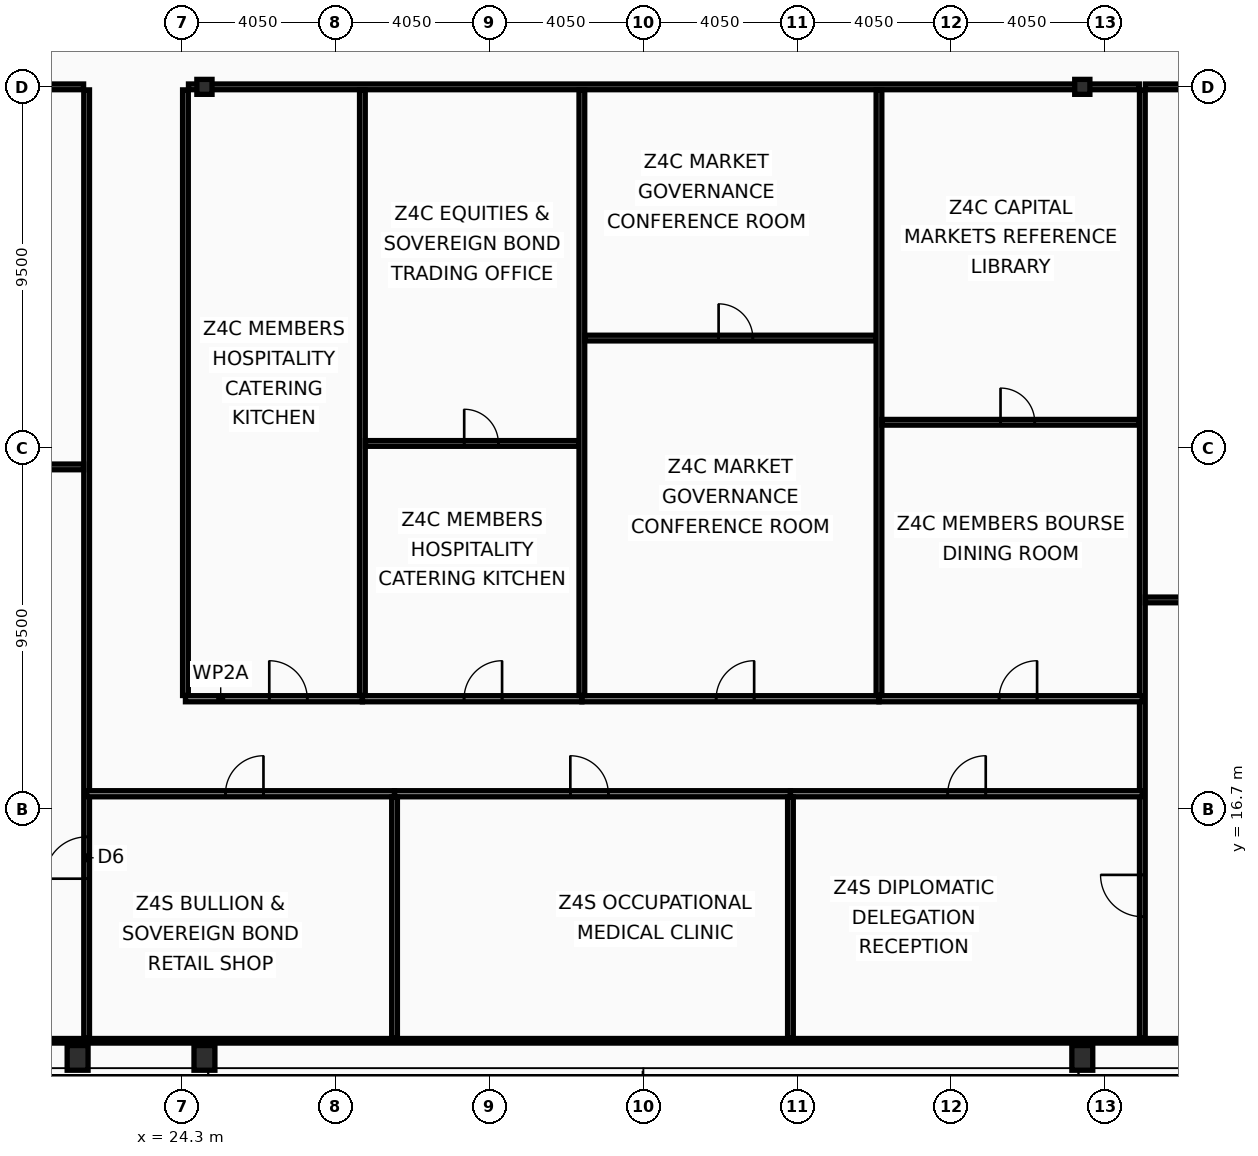
"""IFC4 building model, lengths in metres.
Left out: names, types, materials, properties, quantities, classifications, styles, units other than length and angle.
Written with IfcOpenShell. Run it as: python <this file> out.ifc"""

import sys

from ifc_helpers import new_model, si_unit, direction, frame, frame_2d, origin, origin_2d, place, context, subcontext, project, spatial, rectangle, hollow_rectangle, i_section, extrude, element, fill, save


model = new_model("IFC4")
c1 = context("Model", 3, precision=1e-05, world=origin(), true_north=direction((0.0, 1.0)))
c2 = subcontext(c1, "Body", "Model", "MODEL_VIEW")
j1 = project(units=[si_unit("LENGTHUNIT", "METRE"), si_unit("PLANEANGLEUNIT", "RADIAN")], contexts=[c1])
p1 = place(None, origin())
s1 = spatial("IfcSite", under=j1, at=p1, CompositionType="ELEMENT")
p2 = place(p1, origin())
s2 = spatial("IfcBuilding", under=s1, at=p2, CompositionType="ELEMENT")
p3 = place(p2, frame((0.0, 0.0, 318.2)))
s3 = spatial("IfcBuildingStorey", under=s2, at=p3, CompositionType="ELEMENT", Elevation=318.2)
for number, where, z_axis, x_axis in (
    (1, (21.562, 10.15, 0.0), (0.0, 0.0, 1.0), (1.0, 0.0, 0.0)),
    (2, (24.9, 10.15, 0.0), (0.0, 0.0, 1.0), (1.0, 0.0, 0.0)),
    (3, (48.0, 10.15, 0.0), (0.0, 0.0, 1.0), (1.0, 0.0, 0.0)),
):
    element("IfcColumn", number, at=place(p3, frame(where, z_axis=z_axis, x_axis=x_axis)), inside=s3, PredefinedType="COLUMN", context=c2, shape_type="SweptSolid", body=[
        extrude(hollow_rectangle(XDim=0.55, YDim=0.65, WallThickness=0.04, at=origin_2d()), origin(), (0.0, 0.0, 1.0), 3.6),
    ])
for number, where, z_axis, x_axis in (
    (4, (24.9, 35.7, 0.0), (0.0, 0.0, 1.0), (1.0, 0.0, 0.0)),
    (5, (48.0, 35.7, 0.0), (0.0, 0.0, 1.0), (1.0, 0.0, 0.0)),
):
    element("IfcColumn", number, at=place(p3, frame(where, z_axis=z_axis, x_axis=x_axis)), inside=s3, PredefinedType="COLUMN", context=c2, shape_type="SweptSolid", body=[
        extrude(i_section(OverallWidth=0.399, OverallDepth=0.393, WebThickness=0.023, FlangeThickness=0.037, at=origin_2d()), origin(), (0.0, 0.0, 1.0), 3.6),
    ])
p4 = place(p3, frame((21.8, 10.665, 0.0), z_axis=(0.0, 0.0, 1.0), x_axis=(0.0, 1.0, 0.0)))
e6 = element("IfcWall", 6, at=p4, inside=s3, PredefinedType="PARTITIONING", context=c2, shape_type="SweptSolid", body=[
    extrude(rectangle(XDim=24.955, YDim=0.15, at=frame_2d((12.478, 0.0))), origin(), (0.0, 0.0, 1.0), 3.07),
])
p5 = place(p4, frame((4.2, 0.0, 0.0)))
e7 = element("IfcOpeningElement", 7, at=p5, cuts=e6, PredefinedType="OPENING", context=c2, shape_type="SweptSolid", body=[
    extrude(rectangle(XDim=1.1, YDim=2.1, at=frame_2d((0.55, 1.05))), frame((0.0, 0.085, 0.0), z_axis=(0.0, -1.0, 0.0), x_axis=(1.0, 0.0, 0.0)), (0.0, 0.0, 1.0), 0.17),
])
p6 = place(p3, frame((12.095, 35.7, 0.0), z_axis=(0.0, 0.0, 1.0), x_axis=(1.0, 0.0, 0.0)))
e8 = element("IfcWall", 8, at=p6, inside=s3, PredefinedType="PARTITIONING", context=c2, shape_type="SweptSolid", body=[
    extrude(rectangle(XDim=9.625, YDim=0.15, at=frame_2d((4.812, 0.0))), origin(), (0.0, 0.0, 1.0), 2.83),
])
p7 = place(p6, frame((2.8, 0.0, 0.0)))
e9 = element("IfcOpeningElement", 9, at=p7, cuts=e8, PredefinedType="OPENING", context=c2, shape_type="SweptSolid", body=[
    extrude(rectangle(XDim=1.0, YDim=2.05, at=frame_2d((0.5, 1.025))), frame((0.0, 0.085, 0.0), z_axis=(0.0, -1.0, 0.0), x_axis=(1.0, 0.0, 0.0)), (0.0, 0.0, 1.0), 0.17),
])
p8 = place(p3, frame((12.095, 25.7, 0.0), z_axis=(0.0, 0.0, 1.0), x_axis=(1.0, 0.0, 0.0)))
e10 = element("IfcWall", 10, at=p8, inside=s3, PredefinedType="PARTITIONING", context=c2, shape_type="SweptSolid", body=[
    extrude(rectangle(XDim=9.625, YDim=0.15, at=frame_2d((4.812, 0.0))), origin(), (0.0, 0.0, 1.0), 2.83),
])
p9 = place(p8, frame((2.2, 0.0, 0.0)))
e11 = element("IfcOpeningElement", 11, at=p9, cuts=e10, PredefinedType="OPENING", context=c2, shape_type="SweptSolid", body=[
    extrude(rectangle(XDim=0.9, YDim=2.05, at=frame_2d((0.45, 1.025))), frame((0.0, 0.085, 0.0), z_axis=(0.0, -1.0, 0.0), x_axis=(1.0, 0.0, 0.0)), (0.0, 0.0, 1.0), 0.17),
])
p10 = place(p3, frame((24.4, 19.685, 0.0), z_axis=(0.0, 0.0, 1.0), x_axis=(0.0, 1.0, 0.0)))
e12 = element("IfcWall", 12, at=p10, inside=s3, PredefinedType="PARTITIONING", context=c2, shape_type="SweptSolid", body=[
    extrude(rectangle(XDim=15.935, YDim=0.15, at=frame_2d((7.968, 0.0))), origin(), (0.0, 0.0, 1.0), 2.83),
])
p11 = place(p3, frame((49.58, 10.665, 0.0), z_axis=(0.0, 0.0, 1.0), x_axis=(0.0, 1.0, 0.0)))
e13 = element("IfcWall", 13, at=p11, inside=s3, PredefinedType="PARTITIONING", context=c2, shape_type="SweptSolid", body=[
    extrude(rectangle(XDim=24.955, YDim=0.15, at=frame_2d((12.478, 0.0))), origin(), (0.0, 0.0, 1.0), 3.07),
])
p12 = place(p11, frame((3.2, 0.0, 0.0)))
e14 = element("IfcOpeningElement", 14, at=p12, cuts=e13, PredefinedType="OPENING", context=c2, shape_type="SweptSolid", body=[
    extrude(rectangle(XDim=1.1, YDim=2.1, at=frame_2d((0.55, 1.05))), frame((0.0, 0.085, 0.0), z_axis=(0.0, -1.0, 0.0), x_axis=(1.0, 0.0, 0.0)), (0.0, 0.0, 1.0), 0.17),
])
p13 = place(p3, frame((24.48, 35.7, 0.0), z_axis=(0.0, 0.0, 1.0), x_axis=(1.0, 0.0, 0.0)))
e15 = element("IfcWall", 15, at=p13, inside=s3, PredefinedType="PARTITIONING", context=c2, shape_type="SweptSolid", body=[
    extrude(rectangle(XDim=25.02, YDim=0.15, at=frame_2d((12.51, 0.0))), origin(), (0.0, 0.0, 1.0), 2.83),
])
p14 = place(p3, frame((49.66, 35.7, 0.0), z_axis=(0.0, 0.0, 1.0), x_axis=(1.0, 0.0, 0.0)))
e16 = element("IfcWall", 16, at=p14, inside=s3, PredefinedType="PARTITIONING", context=c2, shape_type="SweptSolid", body=[
    extrude(rectangle(XDim=11.145, YDim=0.15, at=frame_2d((5.573, 0.0))), origin(), (0.0, 0.0, 1.0), 2.83),
])
p15 = place(p14, frame((2.2, 0.0, 0.0)))
e17 = element("IfcOpeningElement", 17, at=p15, cuts=e16, PredefinedType="OPENING", context=c2, shape_type="SweptSolid", body=[
    extrude(rectangle(XDim=1.0, YDim=2.05, at=frame_2d((0.5, 1.025))), frame((0.0, 0.085, 0.0), z_axis=(0.0, -1.0, 0.0), x_axis=(1.0, 0.0, 0.0)), (0.0, 0.0, 1.0), 0.17),
])
p16 = place(p3, frame((49.66, 22.2, 0.0), z_axis=(0.0, 0.0, 1.0), x_axis=(1.0, 0.0, 0.0)))
e18 = element("IfcWall", 18, at=p16, inside=s3, PredefinedType="PARTITIONING", context=c2, shape_type="SweptSolid", body=[
    extrude(rectangle(XDim=11.145, YDim=0.15, at=frame_2d((5.573, 0.0))), origin(), (0.0, 0.0, 1.0), 2.83),
])
p17 = place(p16, frame((2.2, 0.0, 0.0)))
e19 = element("IfcOpeningElement", 19, at=p17, cuts=e18, PredefinedType="OPENING", context=c2, shape_type="SweptSolid", body=[
    extrude(rectangle(XDim=0.9, YDim=2.05, at=frame_2d((0.45, 1.025))), frame((0.0, 0.085, 0.0), z_axis=(0.0, -1.0, 0.0), x_axis=(1.0, 0.0, 0.0)), (0.0, 0.0, 1.0), 0.17),
])
p18 = place(p3, frame((24.4, 19.6, 0.0), z_axis=(0.0, 0.0, 1.0), x_axis=(1.0, 0.0, 0.0)))
e20 = element("IfcWall", 20, at=p18, inside=s3, PredefinedType="PARTITIONING", context=c2, shape_type="SweptSolid", body=[
    extrude(rectangle(XDim=4.656, YDim=0.16, at=frame_2d((2.328, 0.0))), origin(), (0.0, 0.0, 1.0), 2.83),
])
p19 = place(p18, frame((2.206, 0.0, 0.0)))
e21 = element("IfcOpeningElement", 21, at=p19, cuts=e20, PredefinedType="OPENING", context=c2, shape_type="SweptSolid", body=[
    extrude(rectangle(XDim=1.0, YDim=2.05, at=frame_2d((0.5, 1.025))), frame((0.0, 0.09, 0.0), z_axis=(0.0, -1.0, 0.0), x_axis=(1.0, 0.0, 0.0)), (0.0, 0.0, 1.0), 0.18),
])
p20 = place(p3, frame((29.056, 19.6, 0.0), z_axis=(0.0, 0.0, 1.0), x_axis=(1.0, 0.0, 0.0)))
e22 = element("IfcWall", 22, at=p20, inside=s3, PredefinedType="PARTITIONING", context=c2, shape_type="SweptSolid", body=[
    extrude(rectangle(XDim=5.775, YDim=0.16, at=frame_2d((2.888, 0.0))), origin(), (0.0, 0.0, 1.0), 3.44),
])
p21 = place(p20, frame((2.676, 0.0, 0.0)))
e23 = element("IfcOpeningElement", 23, at=p21, cuts=e22, PredefinedType="OPENING", context=c2, shape_type="SweptSolid", body=[
    extrude(rectangle(XDim=1.0, YDim=2.05, at=frame_2d((0.5, 1.025))), frame((0.0, 0.09, 0.0), z_axis=(0.0, -1.0, 0.0), x_axis=(1.0, 0.0, 0.0)), (0.0, 0.0, 1.0), 0.18),
])
p22 = place(p3, frame((29.056, 19.685, 0.0), z_axis=(0.0, 0.0, 1.0), x_axis=(0.0, 1.0, 0.0)))
e24 = element("IfcWall", 24, at=p22, inside=s3, PredefinedType="PARTITIONING", context=c2, shape_type="SweptSolid", body=[
    extrude(rectangle(XDim=15.935, YDim=0.15, at=frame_2d((7.968, 0.0))), origin(), (0.0, 0.0, 1.0), 3.07),
])
p23 = place(p3, frame((29.136, 26.317, 0.0), z_axis=(0.0, 0.0, 1.0), x_axis=(1.0, 0.0, 0.0)))
e25 = element("IfcWall", 25, at=p23, inside=s3, PredefinedType="PARTITIONING", context=c2, shape_type="SweptSolid", body=[
    extrude(rectangle(XDim=5.615, YDim=0.15, at=frame_2d((2.808, 0.0))), origin(), (0.0, 0.0, 1.0), 3.44),
])
p24 = place(p23, frame((2.599, 0.0, 0.0)))
e26 = element("IfcOpeningElement", 26, at=p24, cuts=e25, PredefinedType="OPENING", context=c2, shape_type="SweptSolid", body=[
    extrude(rectangle(XDim=0.9, YDim=2.05, at=frame_2d((0.45, 1.025))), frame((0.0, 0.085, 0.0), z_axis=(0.0, -1.0, 0.0), x_axis=(1.0, 0.0, 0.0)), (0.0, 0.0, 1.0), 0.17),
])
p25 = place(p3, frame((34.832, 19.6, 0.0), z_axis=(0.0, 0.0, 1.0), x_axis=(1.0, 0.0, 0.0)))
e27 = element("IfcWall", 27, at=p25, inside=s3, PredefinedType="PARTITIONING", context=c2, shape_type="SweptSolid", body=[
    extrude(rectangle(XDim=7.818, YDim=0.16, at=frame_2d((3.909, 0.0))), origin(), (0.0, 0.0, 1.0), 3.44),
])
p26 = place(p25, frame((3.534, 0.0, 0.0)))
e28 = element("IfcOpeningElement", 28, at=p26, cuts=e27, PredefinedType="OPENING", context=c2, shape_type="SweptSolid", body=[
    extrude(rectangle(XDim=1.0, YDim=2.05, at=frame_2d((0.5, 1.025))), frame((0.0, 0.09, 0.0), z_axis=(0.0, -1.0, 0.0), x_axis=(1.0, 0.0, 0.0)), (0.0, 0.0, 1.0), 0.18),
])
p27 = place(p3, frame((34.832, 19.685, 0.0), z_axis=(0.0, 0.0, 1.0), x_axis=(0.0, 1.0, 0.0)))
e29 = element("IfcWall", 29, at=p27, inside=s3, PredefinedType="PARTITIONING", context=c2, shape_type="SweptSolid", body=[
    extrude(rectangle(XDim=15.935, YDim=0.15, at=frame_2d((7.968, 0.0))), origin(), (0.0, 0.0, 1.0), 3.07),
])
p28 = place(p3, frame((34.912, 29.09, 0.0), z_axis=(0.0, 0.0, 1.0), x_axis=(1.0, 0.0, 0.0)))
e30 = element("IfcWall", 30, at=p28, inside=s3, PredefinedType="PARTITIONING", context=c2, shape_type="SweptSolid", body=[
    extrude(rectangle(XDim=7.658, YDim=0.15, at=frame_2d((3.829, 0.0))), origin(), (0.0, 0.0, 1.0), 3.44),
])
p29 = place(p28, frame((3.518, 0.0, 0.0)))
e31 = element("IfcOpeningElement", 31, at=p29, cuts=e30, PredefinedType="OPENING", context=c2, shape_type="SweptSolid", body=[
    extrude(rectangle(XDim=0.9, YDim=2.05, at=frame_2d((0.45, 1.025))), frame((0.0, 0.085, 0.0), z_axis=(0.0, -1.0, 0.0), x_axis=(1.0, 0.0, 0.0)), (0.0, 0.0, 1.0), 0.17),
])
p30 = place(p3, frame((42.65, 19.6, 0.0), z_axis=(0.0, 0.0, 1.0), x_axis=(1.0, 0.0, 0.0)))
e32 = element("IfcWall", 32, at=p30, inside=s3, PredefinedType="PARTITIONING", context=c2, shape_type="SweptSolid", body=[
    extrude(rectangle(XDim=6.93, YDim=0.16, at=frame_2d((3.465, 0.0))), origin(), (0.0, 0.0, 1.0), 2.83),
])
p31 = place(p30, frame((3.161, 0.0, 0.0)))
e33 = element("IfcOpeningElement", 33, at=p31, cuts=e32, PredefinedType="OPENING", context=c2, shape_type="SweptSolid", body=[
    extrude(rectangle(XDim=1.0, YDim=2.05, at=frame_2d((0.5, 1.025))), frame((0.0, 0.09, 0.0), z_axis=(0.0, -1.0, 0.0), x_axis=(1.0, 0.0, 0.0)), (0.0, 0.0, 1.0), 0.18),
])
p32 = place(p3, frame((42.65, 19.685, 0.0), z_axis=(0.0, 0.0, 1.0), x_axis=(0.0, 1.0, 0.0)))
e34 = element("IfcWall", 34, at=p32, inside=s3, PredefinedType="PARTITIONING", context=c2, shape_type="SweptSolid", body=[
    extrude(rectangle(XDim=15.935, YDim=0.15, at=frame_2d((7.968, 0.0))), origin(), (0.0, 0.0, 1.0), 3.07),
])
p33 = place(p3, frame((42.73, 26.874, 0.0), z_axis=(0.0, 0.0, 1.0), x_axis=(1.0, 0.0, 0.0)))
e35 = element("IfcWall", 35, at=p33, inside=s3, PredefinedType="PARTITIONING", context=c2, shape_type="SweptSolid", body=[
    extrude(rectangle(XDim=6.77, YDim=0.15, at=frame_2d((3.385, 0.0))), origin(), (0.0, 0.0, 1.0), 2.83),
])
p34 = place(p33, frame((3.119, 0.0, 0.0)))
e36 = element("IfcOpeningElement", 36, at=p34, cuts=e35, PredefinedType="OPENING", context=c2, shape_type="SweptSolid", body=[
    extrude(rectangle(XDim=0.9, YDim=2.05, at=frame_2d((0.45, 1.025))), frame((0.0, 0.085, 0.0), z_axis=(0.0, -1.0, 0.0), x_axis=(1.0, 0.0, 0.0)), (0.0, 0.0, 1.0), 0.17),
])
p35 = place(p3, frame((21.8, 17.1, 0.0), z_axis=(0.0, 0.0, 1.0), x_axis=(1.0, 0.0, 0.0)))
e37 = element("IfcWall", 37, at=p35, inside=s3, PredefinedType="PARTITIONING", context=c2, shape_type="SweptSolid", body=[
    extrude(rectangle(XDim=8.103, YDim=0.16, at=frame_2d((4.051, 0.0))), origin(), (0.0, 0.0, 1.0), 2.83),
])
p36 = place(p35, frame((3.653, 0.0, 0.0)))
e38 = element("IfcOpeningElement", 38, at=p36, cuts=e37, PredefinedType="OPENING", context=c2, shape_type="SweptSolid", body=[
    extrude(rectangle(XDim=1.0, YDim=2.05, at=frame_2d((0.5, 1.025))), frame((0.0, 0.09, 0.0), z_axis=(0.0, -1.0, 0.0), x_axis=(1.0, 0.0, 0.0)), (0.0, 0.0, 1.0), 0.18),
])
p37 = place(p3, frame((29.903, 17.1, 0.0), z_axis=(0.0, 0.0, 1.0), x_axis=(1.0, 0.0, 0.0)))
e39 = element("IfcWall", 39, at=p37, inside=s3, PredefinedType="PARTITIONING", context=c2, shape_type="SweptSolid", body=[
    extrude(rectangle(XDim=10.417, YDim=0.16, at=frame_2d((5.209, 0.0))), origin(), (0.0, 0.0, 1.0), 3.44),
])
p38 = place(p37, frame((4.625, 0.0, 0.0)))
e40 = element("IfcOpeningElement", 40, at=p38, cuts=e39, PredefinedType="OPENING", context=c2, shape_type="SweptSolid", body=[
    extrude(rectangle(XDim=1.0, YDim=2.05, at=frame_2d((0.5, 1.025))), frame((0.0, 0.09, 0.0), z_axis=(0.0, -1.0, 0.0), x_axis=(1.0, 0.0, 0.0)), (0.0, 0.0, 1.0), 0.18),
])
p39 = place(p3, frame((29.903, 10.665, 0.0), z_axis=(0.0, 0.0, 1.0), x_axis=(0.0, 1.0, 0.0)))
e41 = element("IfcWall", 41, at=p39, inside=s3, PredefinedType="PARTITIONING", context=c2, shape_type="SweptSolid", body=[
    extrude(rectangle(XDim=6.35, YDim=0.15, at=frame_2d((3.175, 0.0))), origin(), (0.0, 0.0, 1.0), 3.07),
])
p40 = place(p3, frame((40.32, 17.1, 0.0), z_axis=(0.0, 0.0, 1.0), x_axis=(1.0, 0.0, 0.0)))
e42 = element("IfcWall", 42, at=p40, inside=s3, PredefinedType="PARTITIONING", context=c2, shape_type="SweptSolid", body=[
    extrude(rectangle(XDim=9.26, YDim=0.16, at=frame_2d((4.63, 0.0))), origin(), (0.0, 0.0, 1.0), 2.83),
])
p41 = place(p40, frame((4.139, 0.0, 0.0)))
e43 = element("IfcOpeningElement", 43, at=p41, cuts=e42, PredefinedType="OPENING", context=c2, shape_type="SweptSolid", body=[
    extrude(rectangle(XDim=1.0, YDim=2.05, at=frame_2d((0.5, 1.025))), frame((0.0, 0.09, 0.0), z_axis=(0.0, -1.0, 0.0), x_axis=(1.0, 0.0, 0.0)), (0.0, 0.0, 1.0), 0.18),
])
p42 = place(p3, frame((40.32, 10.665, 0.0), z_axis=(0.0, 0.0, 1.0), x_axis=(0.0, 1.0, 0.0)))
e44 = element("IfcWall", 44, at=p42, inside=s3, PredefinedType="PARTITIONING", context=c2, shape_type="SweptSolid", body=[
    extrude(rectangle(XDim=6.35, YDim=0.15, at=frame_2d((3.175, 0.0))), origin(), (0.0, 0.0, 1.0), 3.07),
])
p43 = place(p3, frame((12.095, 10.6, 0.0), z_axis=(0.0, 0.0, 1.0), x_axis=(1.0, 0.0, 0.0)))
e45 = element("IfcWall", 45, at=p43, inside=s3, PredefinedType="PARTITIONING", context=c2, shape_type="SweptSolid", body=[
    extrude(rectangle(XDim=48.71, YDim=0.12, at=frame_2d((24.355, 0.0))), origin(), (0.0, 0.0, 1.0), 2.83),
])
p44 = place(p5, origin())
e46 = element("IfcDoor", 46, at=p44, inside=s3, OperationType="SINGLE_SWING_LEFT", PredefinedType="DOOR", context=c2, shape_type="SweptSolid", body=[
    extrude(rectangle(XDim=1.1, YDim=2.1, at=frame_2d((0.55, 1.05))), frame((0.0, 0.025, 0.0), z_axis=(0.0, -1.0, 0.0), x_axis=(1.0, 0.0, 0.0)), (0.0, 0.0, 1.0), 0.05),
])
fill(e7, e46)
p45 = place(p12, origin())
e47 = element("IfcDoor", 47, at=p45, inside=s3, OperationType="SINGLE_SWING_RIGHT", PredefinedType="DOOR", context=c2, shape_type="SweptSolid", body=[
    extrude(rectangle(XDim=1.1, YDim=2.1, at=frame_2d((0.55, 1.05))), frame((0.0, 0.025, 0.0), z_axis=(0.0, -1.0, 0.0), x_axis=(1.0, 0.0, 0.0)), (0.0, 0.0, 1.0), 0.05),
])
fill(e14, e47)
p46 = place(p19, origin())
e48 = element("IfcDoor", 48, at=p46, inside=s3, OperationType="SINGLE_SWING_LEFT", PredefinedType="DOOR", context=c2, shape_type="SweptSolid", body=[
    extrude(rectangle(XDim=1.0, YDim=2.05, at=frame_2d((0.5, 1.025))), frame((0.0, 0.025, 0.0), z_axis=(0.0, -1.0, 0.0), x_axis=(1.0, 0.0, 0.0)), (0.0, 0.0, 1.0), 0.05),
])
fill(e21, e48)
p47 = place(p21, origin())
e49 = element("IfcDoor", 49, at=p47, inside=s3, OperationType="SINGLE_SWING_RIGHT", PredefinedType="DOOR", context=c2, shape_type="SweptSolid", body=[
    extrude(rectangle(XDim=1.0, YDim=2.05, at=frame_2d((0.5, 1.025))), frame((0.0, 0.025, 0.0), z_axis=(0.0, -1.0, 0.0), x_axis=(1.0, 0.0, 0.0)), (0.0, 0.0, 1.0), 0.05),
])
fill(e23, e49)
p48 = place(p24, origin())
e50 = element("IfcDoor", 50, at=p48, inside=s3, OperationType="SINGLE_SWING_LEFT", PredefinedType="DOOR", context=c2, shape_type="SweptSolid", body=[
    extrude(rectangle(XDim=0.9, YDim=2.05, at=frame_2d((0.45, 1.025))), frame((0.0, 0.025, 0.0), z_axis=(0.0, -1.0, 0.0), x_axis=(1.0, 0.0, 0.0)), (0.0, 0.0, 1.0), 0.05),
])
fill(e26, e50)
p49 = place(p26, origin())
e51 = element("IfcDoor", 51, at=p49, inside=s3, OperationType="SINGLE_SWING_RIGHT", PredefinedType="DOOR", context=c2, shape_type="SweptSolid", body=[
    extrude(rectangle(XDim=1.0, YDim=2.05, at=frame_2d((0.5, 1.025))), frame((0.0, 0.025, 0.0), z_axis=(0.0, -1.0, 0.0), x_axis=(1.0, 0.0, 0.0)), (0.0, 0.0, 1.0), 0.05),
])
fill(e28, e51)
p50 = place(p29, origin())
e52 = element("IfcDoor", 52, at=p50, inside=s3, OperationType="SINGLE_SWING_LEFT", PredefinedType="DOOR", context=c2, shape_type="SweptSolid", body=[
    extrude(rectangle(XDim=0.9, YDim=2.05, at=frame_2d((0.45, 1.025))), frame((0.0, 0.025, 0.0), z_axis=(0.0, -1.0, 0.0), x_axis=(1.0, 0.0, 0.0)), (0.0, 0.0, 1.0), 0.05),
])
fill(e31, e52)
p51 = place(p31, origin())
e53 = element("IfcDoor", 53, at=p51, inside=s3, OperationType="SINGLE_SWING_RIGHT", PredefinedType="DOOR", context=c2, shape_type="SweptSolid", body=[
    extrude(rectangle(XDim=1.0, YDim=2.05, at=frame_2d((0.5, 1.025))), frame((0.0, 0.025, 0.0), z_axis=(0.0, -1.0, 0.0), x_axis=(1.0, 0.0, 0.0)), (0.0, 0.0, 1.0), 0.05),
])
fill(e33, e53)
p52 = place(p34, origin())
e54 = element("IfcDoor", 54, at=p52, inside=s3, OperationType="SINGLE_SWING_LEFT", PredefinedType="DOOR", context=c2, shape_type="SweptSolid", body=[
    extrude(rectangle(XDim=0.9, YDim=2.05, at=frame_2d((0.45, 1.025))), frame((0.0, 0.025, 0.0), z_axis=(0.0, -1.0, 0.0), x_axis=(1.0, 0.0, 0.0)), (0.0, 0.0, 1.0), 0.05),
])
fill(e36, e54)
p53 = place(p36, origin())
e55 = element("IfcDoor", 55, at=p53, inside=s3, OperationType="SINGLE_SWING_RIGHT", PredefinedType="DOOR", context=c2, shape_type="SweptSolid", body=[
    extrude(rectangle(XDim=1.0, YDim=2.05, at=frame_2d((0.5, 1.025))), frame((0.0, 0.025, 0.0), z_axis=(0.0, -1.0, 0.0), x_axis=(1.0, 0.0, 0.0)), (0.0, 0.0, 1.0), 0.05),
])
fill(e38, e55)
p54 = place(p38, origin())
e56 = element("IfcDoor", 56, at=p54, inside=s3, OperationType="SINGLE_SWING_LEFT", PredefinedType="DOOR", context=c2, shape_type="SweptSolid", body=[
    extrude(rectangle(XDim=1.0, YDim=2.05, at=frame_2d((0.5, 1.025))), frame((0.0, 0.025, 0.0), z_axis=(0.0, -1.0, 0.0), x_axis=(1.0, 0.0, 0.0)), (0.0, 0.0, 1.0), 0.05),
])
fill(e40, e56)
p55 = place(p41, origin())
e57 = element("IfcDoor", 57, at=p55, inside=s3, OperationType="SINGLE_SWING_RIGHT", PredefinedType="DOOR", context=c2, shape_type="SweptSolid", body=[
    extrude(rectangle(XDim=1.0, YDim=2.05, at=frame_2d((0.5, 1.025))), frame((0.0, 0.025, 0.0), z_axis=(0.0, -1.0, 0.0), x_axis=(1.0, 0.0, 0.0)), (0.0, 0.0, 1.0), 0.05),
])
fill(e43, e57)
save(model, sys.argv[1])
